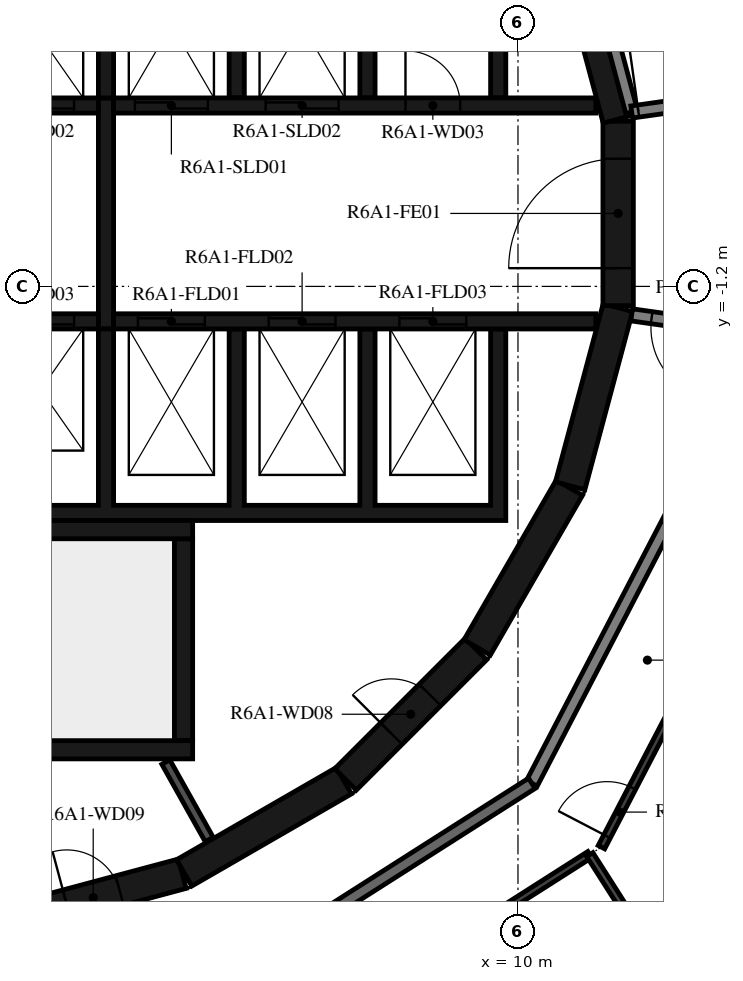
"""IFC4 building model, lengths in metres.
Left out: names, types, materials, properties, quantities, classifications, styles, units other than length and angle.
Written with IfcOpenShell. Run it as: python <this file> out.ifc"""

import sys

from ifc_helpers import new_model, si_unit, direction, frame, frame_2d, origin, place, context, subcontext, project, spatial, polyline, rectangle, outline, extrude, element, fill, save


model = new_model("IFC4")
c1 = context("Model", 3, precision=1e-05, world=origin(), true_north=direction((0.0, 1.0)))
c2 = subcontext(c1, "Body", "Model", "MODEL_VIEW")
j1 = project(units=[si_unit("LENGTHUNIT", "METRE"), si_unit("PLANEANGLEUNIT", "RADIAN")], contexts=[c1])
p1 = place(None, origin())
s1 = spatial("IfcSite", under=j1, at=p1, CompositionType="ELEMENT")
p2 = place(p1, origin())
s2 = spatial("IfcBuilding", under=s1, at=p2, CompositionType="ELEMENT")
p3 = place(p2, frame((0.0, 0.0, 230.2)))
s3 = spatial("IfcBuildingStorey", under=s2, at=p3, CompositionType="ELEMENT", Elevation=230.2)
p4 = place(p3, frame((1.55, -11.643, 0.0), z_axis=(0.0, 0.0, 1.0), x_axis=(0.965948410781, 0.258734743916, 0.0)))
e1 = element("IfcWall", 1, at=p4, inside=s3, PredefinedType="SHEAR", context=c2, shape_type="SweptSolid", body=[
    extrude(rectangle(XDim=3.033, YDim=0.5, at=frame_2d((1.516, 0.0))), origin(), (0.0, 0.0, 1.0), 3.12),
])
p5 = place(p4, frame((1.066, 0.0, 0.0)))
e2 = element("IfcOpeningElement", 2, at=p5, cuts=e1, PredefinedType="OPENING", context=c2, shape_type="SweptSolid", body=[
    extrude(rectangle(XDim=0.9, YDim=2.1, at=frame_2d((0.45, 1.05))), frame((0.0, 0.26, 0.0), z_axis=(0.0, -1.0, 0.0), x_axis=(1.0, 0.0, 0.0)), (0.0, 0.0, 1.0), 0.52),
])
p6 = place(p3, frame((4.51, -10.845, 0.0), z_axis=(0.0, 0.0, 1.0), x_axis=(0.865975092491, 0.500087131594, 0.0)))
e3 = element("IfcWall", 3, at=p6, inside=s3, PredefinedType="SHEAR", context=c2, shape_type="SweptSolid", body=[
    extrude(rectangle(XDim=3.033, YDim=0.5, at=frame_2d((1.516, 0.0))), origin(), (0.0, 0.0, 1.0), 3.12),
])
p7 = place(p3, frame((7.164, -9.308, 0.0), z_axis=(0.0, 0.0, 1.0), x_axis=(0.707106781187, 0.707106781187, 0.0)))
e4 = element("IfcWall", 4, at=p7, inside=s3, PredefinedType="SHEAR", context=c2, shape_type="SweptSolid", body=[
    extrude(rectangle(XDim=3.032, YDim=0.5, at=frame_2d((1.516, 0.0))), origin(), (0.0, 0.0, 1.0), 3.12),
])
p8 = place(p7, frame((1.066, 0.0, 0.0)))
e5 = element("IfcOpeningElement", 5, at=p8, cuts=e4, PredefinedType="OPENING", context=c2, shape_type="SweptSolid", body=[
    extrude(rectangle(XDim=0.9, YDim=2.1, at=frame_2d((0.45, 1.05))), frame((0.0, 0.26, 0.0), z_axis=(0.0, -1.0, 0.0), x_axis=(1.0, 0.0, 0.0)), (0.0, 0.0, 1.0), 0.52),
])
for number, where, z_axis, x_axis in (
    (6, (9.329, -7.137, 0.0), (0.0, 0.0, 1.0), (0.5, 0.866, 0.0)),
    (7, (10.858, -4.479, 0.0), (0.0, 0.0, 1.0), (0.259, 0.966, 0.0)),
):
    element("IfcWall", number, at=place(p3, frame(where, z_axis=z_axis, x_axis=x_axis)), inside=s3, PredefinedType="SHEAR", context=c2, shape_type="SweptSolid", body=[
        extrude(rectangle(XDim=3.033, YDim=0.5, at=frame_2d((1.516, 0.0))), origin(), (0.0, 0.0, 1.0), 3.12),
    ])
p9 = place(p3, frame((11.647, -1.516, 0.0), z_axis=(0.0, 0.0, 1.0), x_axis=(0.0, 1.0, 0.0)))
e8 = element("IfcWall", 8, at=p9, inside=s3, PredefinedType="SHEAR", context=c2, shape_type="SweptSolid", body=[
    extrude(rectangle(XDim=3.033, YDim=0.5, at=frame_2d((1.516, 0.0))), origin(), (0.0, 0.0, 1.0), 3.12),
])
p10 = place(p9, frame((0.616, 0.0, 0.0)))
e9 = element("IfcOpeningElement", 9, at=p10, cuts=e8, PredefinedType="OPENING", context=c2, shape_type="SweptSolid", body=[
    extrude(rectangle(XDim=1.8, YDim=2.1, at=frame_2d((0.9, 1.05))), frame((0.0, 0.26, 0.0), z_axis=(0.0, -1.0, 0.0), x_axis=(1.0, 0.0, 0.0)), (0.0, 0.0, 1.0), 0.52),
])
p11 = place(p3, frame((11.643, 1.55, 0.0), z_axis=(0.0, 0.0, 1.0), x_axis=(-0.258734743916, 0.965948410781, 0.0)))
e10 = element("IfcWall", 10, at=p11, inside=s3, PredefinedType="SHEAR", context=c2, shape_type="SweptSolid", body=[
    extrude(rectangle(XDim=3.033, YDim=0.5, at=frame_2d((1.516, 0.0))), origin(), (0.0, 0.0, 1.0), 3.12),
])
p12 = place(p3, frame((-2.4, -5.2, 0.0), z_axis=(0.0, 0.0, 1.0), x_axis=(1.0, 0.0, 0.0)))
e11 = element("IfcWall", 11, at=p12, inside=s3, PredefinedType="SHEAR", context=c2, shape_type="SweptSolid", body=[
    extrude(rectangle(XDim=7.05, YDim=0.3, at=frame_2d((3.525, 0.0))), origin(), (0.0, 0.0, 1.0), 3.12),
])
p13 = place(p3, frame((4.5, -8.67, 0.0), z_axis=(0.0, 0.0, 1.0), x_axis=(0.0, 1.0, 0.0)))
e12 = element("IfcWall", 12, at=p13, inside=s3, PredefinedType="SHEAR", context=c2, shape_type="SweptSolid", body=[
    extrude(rectangle(XDim=3.32, YDim=0.3, at=frame_2d((1.66, 0.0))), origin(), (0.0, 0.0, 1.0), 3.12),
])
p14 = place(p3, frame((0.1, -8.82, 0.0), z_axis=(0.0, 0.0, 1.0), x_axis=(1.0, 0.0, 0.0)))
e13 = element("IfcWall", 13, at=p14, inside=s3, PredefinedType="SHEAR", context=c2, shape_type="SweptSolid", body=[
    extrude(rectangle(XDim=4.55, YDim=0.3, at=frame_2d((2.275, 0.0))), origin(), (0.0, 0.0, 1.0), 3.12),
])
p15 = place(p3, origin())
e14 = element("IfcWall", 14, at=p15, inside=s3, PredefinedType="SHEAR", context=c2, shape_type="SweptSolid", body=[
    extrude(outline(polyline([(-9.55, 4.8), (-5.5, 4.8), (-5.5, 1.9), (-5.25, 1.9), (-5.25, 4.8), (-1.2, 4.8), (-1.2, 1.9), (-0.95, 1.9), (-0.95, 4.8), (0.95, 4.8), (0.95, 1.9), (1.2, 1.9), (1.2, 4.8), (3.1, 4.8), (3.1, 1.9), (3.35, 1.9), (3.35, 4.8), (5.25, 4.8), (5.25, 1.9), (5.5, 1.9), (5.5, 4.8), (7.4, 4.8), (7.4, 1.9), (7.65, 1.9), (7.65, 4.8), (9.55, 4.8), (9.55, 1.9), (9.8, 1.9), (9.8, 4.8), (9.8, 5.05), (-9.8, 5.05), (-9.8, 4.8), (-9.8, 1.9), (-9.55, 1.9), (-9.55, 4.8)])), origin(), (0.0, 0.0, 1.0), 3.12),
])
p16 = place(p3, origin())
e15 = element("IfcWall", 15, at=p16, inside=s3, PredefinedType="SHEAR", context=c2, shape_type="SweptSolid", body=[
    extrude(outline(polyline([(9.8, -5.05), (9.8, -4.8), (9.8, -1.9), (9.55, -1.9), (9.55, -4.8), (7.65, -4.8), (7.65, -1.9), (7.4, -1.9), (7.4, -4.8), (5.5, -4.8), (5.5, -1.9), (5.25, -1.9), (5.25, -4.8), (3.35, -4.8), (3.35, -1.9), (3.1, -1.9), (3.1, -4.8), (1.2, -4.8), (1.2, -1.9), (0.95, -1.9), (0.95, -4.8), (-0.95, -4.8), (-0.95, -1.9), (-1.2, -1.9), (-1.2, -4.8), (-5.25, -4.8), (-5.25, -1.9), (-5.5, -1.9), (-5.5, -4.8), (-7.4, -4.8), (-7.4, -1.9), (-7.65, -1.9), (-7.65, -4.8), (-9.55, -4.8), (-9.55, -1.9), (-9.8, -1.9), (-9.8, -4.8), (-9.8, -5.05), (9.8, -5.05)])), origin(), (0.0, 0.0, 1.0), 3.12),
])
p17 = place(p3, frame((-11.28, 1.775, 0.0), z_axis=(0.0, 0.0, 1.0), x_axis=(1.0, 0.0, 0.0)))
e16 = element("IfcWall", 16, at=p17, inside=s3, PredefinedType="SHEAR", context=c2, shape_type="SweptSolid", body=[
    extrude(rectangle(XDim=14.38, YDim=0.25, at=frame_2d((7.19, 0.0))), origin(), (0.0, 0.0, 1.0), 3.12),
])
p18 = place(p17, frame((10.73, 0.0, 0.0)))
e17 = element("IfcOpeningElement", 17, at=p18, cuts=e16, PredefinedType="OPENING", context=c2, shape_type="SweptSolid", body=[
    extrude(rectangle(XDim=1.1, YDim=2.1, at=frame_2d((0.55, 1.05))), frame((0.0, 0.135, 0.0), z_axis=(0.0, -1.0, 0.0), x_axis=(1.0, 0.0, 0.0)), (0.0, 0.0, 1.0), 0.27),
])
p19 = place(p17, frame((12.88, 0.0, 0.0)))
e18 = element("IfcOpeningElement", 18, at=p19, cuts=e16, PredefinedType="OPENING", context=c2, shape_type="SweptSolid", body=[
    extrude(rectangle(XDim=1.1, YDim=2.1, at=frame_2d((0.55, 1.05))), frame((0.0, 0.135, 0.0), z_axis=(0.0, -1.0, 0.0), x_axis=(1.0, 0.0, 0.0)), (0.0, 0.0, 1.0), 0.27),
])
p20 = place(p17, frame((3.305, 0.0, 0.0)))
e19 = element("IfcOpeningElement", 19, at=p20, cuts=e16, PredefinedType="OPENING", context=c2, shape_type="SweptSolid", body=[
    extrude(rectangle(XDim=0.9, YDim=2.1, at=frame_2d((0.45, 1.05))), frame((0.0, 0.135, 0.0), z_axis=(0.0, -1.0, 0.0), x_axis=(1.0, 0.0, 0.0)), (0.0, 0.0, 1.0), 0.27),
])
p21 = place(p17, frame((7.605, 0.0, 0.0)))
e20 = element("IfcOpeningElement", 20, at=p21, cuts=e16, PredefinedType="OPENING", context=c2, shape_type="SweptSolid", body=[
    extrude(rectangle(XDim=0.9, YDim=2.1, at=frame_2d((0.45, 1.05))), frame((0.0, 0.135, 0.0), z_axis=(0.0, -1.0, 0.0), x_axis=(1.0, 0.0, 0.0)), (0.0, 0.0, 1.0), 0.27),
])
p22 = place(p3, frame((3.35, 1.775, 0.0), z_axis=(0.0, 0.0, 1.0), x_axis=(1.0, 0.0, 0.0)))
e21 = element("IfcWall", 21, at=p22, inside=s3, PredefinedType="SHEAR", context=c2, shape_type="SweptSolid", body=[
    extrude(rectangle(XDim=7.93, YDim=0.25, at=frame_2d((3.965, 0.0))), origin(), (0.0, 0.0, 1.0), 3.12),
])
p23 = place(p22, frame((0.35, 0.0, 0.0)))
e22 = element("IfcOpeningElement", 22, at=p23, cuts=e21, PredefinedType="OPENING", context=c2, shape_type="SweptSolid", body=[
    extrude(rectangle(XDim=1.2, YDim=2.4, at=frame_2d((0.6, 1.2))), frame((0.0, 0.135, 0.0), z_axis=(0.0, -1.0, 0.0), x_axis=(1.0, 0.0, 0.0)), (0.0, 0.0, 1.0), 0.27),
])
p24 = place(p22, frame((2.5, 0.0, 0.0)))
e23 = element("IfcOpeningElement", 23, at=p24, cuts=e21, PredefinedType="OPENING", context=c2, shape_type="SweptSolid", body=[
    extrude(rectangle(XDim=1.2, YDim=2.4, at=frame_2d((0.6, 1.2))), frame((0.0, 0.135, 0.0), z_axis=(0.0, -1.0, 0.0), x_axis=(1.0, 0.0, 0.0)), (0.0, 0.0, 1.0), 0.27),
])
p25 = place(p22, frame((4.8, 0.0, 0.0)))
e24 = element("IfcOpeningElement", 24, at=p25, cuts=e21, PredefinedType="OPENING", context=c2, shape_type="SweptSolid", body=[
    extrude(rectangle(XDim=0.9, YDim=2.1, at=frame_2d((0.45, 1.05))), frame((0.0, 0.135, 0.0), z_axis=(0.0, -1.0, 0.0), x_axis=(1.0, 0.0, 0.0)), (0.0, 0.0, 1.0), 0.27),
])
p26 = place(p3, frame((-11.28, -1.775, 0.0), z_axis=(0.0, 0.0, 1.0), x_axis=(1.0, 0.0, 0.0)))
e25 = element("IfcWall", 25, at=p26, inside=s3, PredefinedType="SHEAR", context=c2, shape_type="SweptSolid", body=[
    extrude(rectangle(XDim=14.38, YDim=0.25, at=frame_2d((7.19, 0.0))), origin(), (0.0, 0.0, 1.0), 3.12),
])
p27 = place(p26, frame((12.88, 0.0, 0.0)))
e26 = element("IfcOpeningElement", 26, at=p27, cuts=e25, PredefinedType="OPENING", context=c2, shape_type="SweptSolid", body=[
    extrude(rectangle(XDim=1.1, YDim=2.1, at=frame_2d((0.55, 1.05))), frame((0.0, 0.135, 0.0), z_axis=(0.0, -1.0, 0.0), x_axis=(1.0, 0.0, 0.0)), (0.0, 0.0, 1.0), 0.27),
])
p28 = place(p26, frame((7.605, 0.0, 0.0)))
e27 = element("IfcOpeningElement", 27, at=p28, cuts=e25, PredefinedType="OPENING", context=c2, shape_type="SweptSolid", body=[
    extrude(rectangle(XDim=0.9, YDim=2.1, at=frame_2d((0.45, 1.05))), frame((0.0, 0.135, 0.0), z_axis=(0.0, -1.0, 0.0), x_axis=(1.0, 0.0, 0.0)), (0.0, 0.0, 1.0), 0.27),
])
p29 = place(p26, frame((10.83, 0.0, 0.0)))
e28 = element("IfcOpeningElement", 28, at=p29, cuts=e25, PredefinedType="OPENING", context=c2, shape_type="SweptSolid", body=[
    extrude(rectangle(XDim=0.9, YDim=2.1, at=frame_2d((0.45, 1.05))), frame((0.0, 0.135, 0.0), z_axis=(0.0, -1.0, 0.0), x_axis=(1.0, 0.0, 0.0)), (0.0, 0.0, 1.0), 0.27),
])
p30 = place(p3, frame((3.35, -1.775, 0.0), z_axis=(0.0, 0.0, 1.0), x_axis=(1.0, 0.0, 0.0)))
e29 = element("IfcWall", 29, at=p30, inside=s3, PredefinedType="SHEAR", context=c2, shape_type="SweptSolid", body=[
    extrude(rectangle(XDim=7.93, YDim=0.25, at=frame_2d((3.965, 0.0))), origin(), (0.0, 0.0, 1.0), 3.12),
])
p31 = place(p30, frame((0.4, 0.0, 0.0)))
e30 = element("IfcOpeningElement", 30, at=p31, cuts=e29, PredefinedType="OPENING", context=c2, shape_type="SweptSolid", body=[
    extrude(rectangle(XDim=1.1, YDim=2.4, at=frame_2d((0.55, 1.2))), frame((0.0, 0.135, 0.0), z_axis=(0.0, -1.0, 0.0), x_axis=(1.0, 0.0, 0.0)), (0.0, 0.0, 1.0), 0.27),
])
p32 = place(p30, frame((2.55, 0.0, 0.0)))
e31 = element("IfcOpeningElement", 31, at=p32, cuts=e29, PredefinedType="OPENING", context=c2, shape_type="SweptSolid", body=[
    extrude(rectangle(XDim=1.1, YDim=2.4, at=frame_2d((0.55, 1.2))), frame((0.0, 0.135, 0.0), z_axis=(0.0, -1.0, 0.0), x_axis=(1.0, 0.0, 0.0)), (0.0, 0.0, 1.0), 0.27),
])
p33 = place(p30, frame((4.7, 0.0, 0.0)))
e32 = element("IfcOpeningElement", 32, at=p33, cuts=e29, PredefinedType="OPENING", context=c2, shape_type="SweptSolid", body=[
    extrude(rectangle(XDim=1.1, YDim=2.4, at=frame_2d((0.55, 1.2))), frame((0.0, 0.135, 0.0), z_axis=(0.0, -1.0, 0.0), x_axis=(1.0, 0.0, 0.0)), (0.0, 0.0, 1.0), 0.27),
])
p34 = place(p3, frame((3.225, -1.9, 0.0), z_axis=(0.0, 0.0, 1.0), x_axis=(0.0, 1.0, 0.0)))
e33 = element("IfcWall", 33, at=p34, inside=s3, PredefinedType="SHEAR", context=c2, shape_type="SweptSolid", body=[
    extrude(rectangle(XDim=3.8, YDim=0.25, at=frame_2d((1.9, 0.0))), origin(), (0.0, 0.0, 1.0), 3.12),
])
p35 = place(p3, frame((4.922, -10.296, 0.0), z_axis=(0.0, 0.0, 1.0), x_axis=(-0.48860846254, 0.872503163509, 0.0)))
e34 = element("IfcWall", 34, at=p35, inside=s3, PredefinedType="PARTITIONING", context=c2, shape_type="SweptSolid", body=[
    extrude(rectangle(XDim=1.459, YDim=0.15, at=frame_2d((0.73, 0.0))), origin(), (0.0, 0.0, 1.0), 3.12),
])
p36 = place(p3, frame((11.87, 1.668, 0.0), z_axis=(0.0, 0.0, 1.0), x_axis=(-0.258836880648, 0.965921047093, 0.0)))
e35 = element("IfcWall", 35, at=p36, inside=s3, PredefinedType="STANDARD", context=c2, shape_type="SweptSolid", body=[
    extrude(rectangle(XDim=1.695, YDim=0.2, at=frame_2d((0.848, 0.0))), origin(), (0.0, 0.0, 1.0), 3.12),
])
p37 = place(p3, frame((11.87, 1.668, 0.0), z_axis=(0.0, 0.0, 1.0), x_axis=(0.990267985606, 0.139173692496, 0.0)))
e36 = element("IfcWall", 36, at=p37, inside=s3, PredefinedType="STANDARD", context=c2, shape_type="SweptSolid", body=[
    extrude(rectangle(XDim=1.475, YDim=0.2, at=frame_2d((0.738, 0.0))), origin(), (0.0, 0.0, 1.0), 3.12),
])
p38 = place(p37, frame((0.11, 0.0, 0.0)))
e37 = element("IfcOpeningElement", 37, at=p38, cuts=e36, PredefinedType="OPENING", context=c2, shape_type="SweptSolid", body=[
    extrude(rectangle(XDim=1.2, YDim=2.1, at=frame_2d((0.6, 1.05))), frame((0.0, 0.11, 0.0), z_axis=(0.0, -1.0, 0.0), x_axis=(1.0, 0.0, 0.0)), (0.0, 0.0, 1.0), 0.22),
])
p39 = place(p3, frame((10.228, -9.372, 0.0), z_axis=(0.0, 0.0, 1.0), x_axis=(0.461759464021, 0.887005184532, 0.0)))
e38 = element("IfcWall", 38, at=p39, inside=s3, PredefinedType="STANDARD", context=c2, shape_type="SweptSolid", body=[
    extrude(rectangle(XDim=7.181, YDim=0.2, at=frame_2d((3.591, 0.0))), origin(), (0.0, 0.0, 1.0), 3.12),
])
p40 = place(p3, frame((13.496, -1.897, 0.0), z_axis=(0.0, 0.0, 1.0), x_axis=(-0.99026234641, 0.139213811391, 0.0)))
e39 = element("IfcWall", 39, at=p40, inside=s3, PredefinedType="STANDARD", context=c2, shape_type="SweptSolid", body=[
    extrude(rectangle(XDim=1.641, YDim=0.2, at=frame_2d((0.821, 0.0))), origin(), (0.0, 0.0, 1.0), 3.12),
])
p41 = place(p40, frame((0.11, 0.0, 0.0)))
e40 = element("IfcOpeningElement", 40, at=p41, cuts=e39, PredefinedType="OPENING", context=c2, shape_type="SweptSolid", body=[
    extrude(rectangle(XDim=1.2, YDim=2.1, at=frame_2d((0.6, 1.05))), frame((0.0, 0.11, 0.0), z_axis=(0.0, -1.0, 0.0), x_axis=(1.0, 0.0, 0.0)), (0.0, 0.0, 1.0), 0.22),
])
p42 = place(p3, frame((4.172, -13.231, 0.0), z_axis=(0.0, 0.0, 1.0), x_axis=(0.843388394728, 0.537304397561, 0.0)))
e41 = element("IfcWall", 41, at=p42, inside=s3, PredefinedType="STANDARD", context=c2, shape_type="SweptSolid", body=[
    extrude(rectangle(XDim=7.181, YDim=0.2, at=frame_2d((3.59, 0.0))), origin(), (0.0, 0.0, 1.0), 3.12),
])
p43 = place(p42, frame((0.2, 0.0, 0.0)))
e42 = element("IfcOpeningElement", 42, at=p43, cuts=e41, PredefinedType="OPENING", context=c2, shape_type="SweptSolid", body=[
    extrude(rectangle(XDim=1.0, YDim=2.1, at=frame_2d((0.5, 1.05))), frame((0.0, 0.11, 0.0), z_axis=(0.0, -1.0, 0.0), x_axis=(1.0, 0.0, 0.0)), (0.0, 0.0, 1.0), 0.22),
])
p44 = place(p3, frame((4.83, -14.59, 0.0), z_axis=(0.0, 0.0, 1.0), x_axis=(0.843393042763, 0.537297101629, 0.0)))
e43 = element("IfcWall", 43, at=p44, inside=s3, PredefinedType="PARTITIONING", context=c2, shape_type="SweptSolid", body=[
    extrude(rectangle(XDim=7.53, YDim=0.12, at=frame_2d((3.765, 0.0))), origin(), (0.0, 0.0, 1.0), 3.12),
])
p45 = place(p44, frame((0.2, 0.0, 0.0)))
e44 = element("IfcOpeningElement", 44, at=p45, cuts=e43, PredefinedType="OPENING", context=c2, shape_type="SweptSolid", body=[
    extrude(rectangle(XDim=0.9, YDim=2.1, at=frame_2d((0.45, 1.05))), frame((0.0, 0.07, 0.0), z_axis=(0.0, -1.0, 0.0), x_axis=(1.0, 0.0, 0.0)), (0.0, 0.0, 1.0), 0.14),
])
p46 = place(p3, frame((11.373, -10.421, 0.0), z_axis=(0.0, 0.0, 1.0), x_axis=(0.461738939635, 0.887015868869, 0.0)))
e45 = element("IfcWall", 45, at=p46, inside=s3, PredefinedType="PARTITIONING", context=c2, shape_type="SweptSolid", body=[
    extrude(rectangle(XDim=5.752, YDim=0.12, at=frame_2d((2.876, 0.0))), origin(), (0.0, 0.0, 1.0), 3.12),
])
p47 = place(p46, frame((0.2, 0.0, 0.0)))
e46 = element("IfcOpeningElement", 46, at=p47, cuts=e45, PredefinedType="OPENING", context=c2, shape_type="SweptSolid", body=[
    extrude(rectangle(XDim=0.9, YDim=2.1, at=frame_2d((0.45, 1.05))), frame((0.0, 0.07, 0.0), z_axis=(0.0, -1.0, 0.0), x_axis=(1.0, 0.0, 0.0)), (0.0, 0.0, 1.0), 0.14),
])
p48 = place(p3, frame((12.758, -13.018, 0.0), z_axis=(0.0, 0.0, 1.0), x_axis=(-0.537338423153, 0.843366716798, 0.0)))
e47 = element("IfcWall", 47, at=p48, inside=s3, PredefinedType="PARTITIONING", context=c2, shape_type="SweptSolid", body=[
    extrude(rectangle(XDim=2.934, YDim=0.12, at=frame_2d((1.467, 0.0))), origin(), (0.0, 0.0, 1.0), 2.73),
])
p49 = place(p10, origin())
e48 = element("IfcDoor", 48, at=p49, inside=s3, OperationType="DOUBLE_DOOR_SINGLE_SWING", PredefinedType="DOOR", context=c2, shape_type="SweptSolid", body=[
    extrude(rectangle(XDim=1.8, YDim=2.1, at=frame_2d((0.9, 1.05))), frame((0.0, 0.025, 0.0), z_axis=(0.0, -1.0, 0.0), x_axis=(1.0, 0.0, 0.0)), (0.0, 0.0, 1.0), 0.05),
])
fill(e9, e48)
p50 = place(p19, origin())
e49 = element("IfcDoor", 49, at=p50, inside=s3, OperationType="DOUBLE_DOOR_SLIDING", PredefinedType="DOOR", context=c2, shape_type="SweptSolid", body=[
    extrude(rectangle(XDim=1.1, YDim=2.1, at=frame_2d((0.55, 1.05))), frame((0.0, 0.025, 0.0), z_axis=(0.0, -1.0, 0.0), x_axis=(1.0, 0.0, 0.0)), (0.0, 0.0, 1.0), 0.05),
])
fill(e18, e49)
p51 = place(p23, origin())
e50 = element("IfcDoor", 50, at=p51, inside=s3, OperationType="DOUBLE_DOOR_SLIDING", PredefinedType="DOOR", context=c2, shape_type="SweptSolid", body=[
    extrude(rectangle(XDim=1.2, YDim=2.4, at=frame_2d((0.6, 1.2))), frame((0.0, 0.025, 0.0), z_axis=(0.0, -1.0, 0.0), x_axis=(1.0, 0.0, 0.0)), (0.0, 0.0, 1.0), 0.05),
])
fill(e22, e50)
p52 = place(p24, origin())
e51 = element("IfcDoor", 51, at=p52, inside=s3, OperationType="DOUBLE_DOOR_SLIDING", PredefinedType="DOOR", context=c2, shape_type="SweptSolid", body=[
    extrude(rectangle(XDim=1.2, YDim=2.4, at=frame_2d((0.6, 1.2))), frame((0.0, 0.025, 0.0), z_axis=(0.0, -1.0, 0.0), x_axis=(1.0, 0.0, 0.0)), (0.0, 0.0, 1.0), 0.05),
])
fill(e23, e51)
p53 = place(p27, origin())
e52 = element("IfcDoor", 52, at=p53, inside=s3, OperationType="DOUBLE_DOOR_SLIDING", PredefinedType="DOOR", context=c2, shape_type="SweptSolid", body=[
    extrude(rectangle(XDim=1.1, YDim=2.1, at=frame_2d((0.55, 1.05))), frame((0.0, 0.025, 0.0), z_axis=(0.0, -1.0, 0.0), x_axis=(1.0, 0.0, 0.0)), (0.0, 0.0, 1.0), 0.05),
])
fill(e26, e52)
p54 = place(p31, origin())
e53 = element("IfcDoor", 53, at=p54, inside=s3, OperationType="DOUBLE_DOOR_SLIDING", PredefinedType="DOOR", context=c2, shape_type="SweptSolid", body=[
    extrude(rectangle(XDim=1.1, YDim=2.4, at=frame_2d((0.55, 1.2))), frame((0.0, 0.025, 0.0), z_axis=(0.0, -1.0, 0.0), x_axis=(1.0, 0.0, 0.0)), (0.0, 0.0, 1.0), 0.05),
])
fill(e30, e53)
p55 = place(p32, origin())
e54 = element("IfcDoor", 54, at=p55, inside=s3, OperationType="DOUBLE_DOOR_SLIDING", PredefinedType="DOOR", context=c2, shape_type="SweptSolid", body=[
    extrude(rectangle(XDim=1.1, YDim=2.4, at=frame_2d((0.55, 1.2))), frame((0.0, 0.025, 0.0), z_axis=(0.0, -1.0, 0.0), x_axis=(1.0, 0.0, 0.0)), (0.0, 0.0, 1.0), 0.05),
])
fill(e31, e54)
p56 = place(p33, origin())
e55 = element("IfcDoor", 55, at=p56, inside=s3, OperationType="DOUBLE_DOOR_SLIDING", PredefinedType="DOOR", context=c2, shape_type="SweptSolid", body=[
    extrude(rectangle(XDim=1.1, YDim=2.4, at=frame_2d((0.55, 1.2))), frame((0.0, 0.025, 0.0), z_axis=(0.0, -1.0, 0.0), x_axis=(1.0, 0.0, 0.0)), (0.0, 0.0, 1.0), 0.05),
])
fill(e32, e55)
p57 = place(p25, origin())
e56 = element("IfcDoor", 56, at=p57, inside=s3, OperationType="SINGLE_SWING_LEFT", PredefinedType="DOOR", context=c2, shape_type="SweptSolid", body=[
    extrude(rectangle(XDim=0.9, YDim=2.1, at=frame_2d((0.45, 1.05))), frame((0.0, 0.025, 0.0), z_axis=(0.0, -1.0, 0.0), x_axis=(1.0, 0.0, 0.0)), (0.0, 0.0, 1.0), 0.05),
])
fill(e24, e56)
p58 = place(p8, origin())
e57 = element("IfcDoor", 57, at=p58, inside=s3, OperationType="SINGLE_SWING_RIGHT", PredefinedType="DOOR", context=c2, shape_type="SweptSolid", body=[
    extrude(rectangle(XDim=0.9, YDim=2.1, at=frame_2d((0.45, 1.05))), frame((0.0, 0.025, 0.0), z_axis=(0.0, -1.0, 0.0), x_axis=(1.0, 0.0, 0.0)), (0.0, 0.0, 1.0), 0.05),
])
fill(e5, e57)
p59 = place(p5, origin())
e58 = element("IfcDoor", 58, at=p59, inside=s3, OperationType="SINGLE_SWING_LEFT", PredefinedType="DOOR", context=c2, shape_type="SweptSolid", body=[
    extrude(rectangle(XDim=0.9, YDim=2.1, at=frame_2d((0.45, 1.05))), frame((0.0, 0.025, 0.0), z_axis=(0.0, -1.0, 0.0), x_axis=(1.0, 0.0, 0.0)), (0.0, 0.0, 1.0), 0.05),
])
fill(e2, e58)
p60 = place(p47, origin())
e59 = element("IfcDoor", 59, at=p60, inside=s3, OperationType="SINGLE_SWING_RIGHT", PredefinedType="DOOR", context=c2, shape_type="SweptSolid", body=[
    extrude(rectangle(XDim=0.9, YDim=2.1, at=frame_2d((0.45, 1.05))), frame((0.0, 0.025, 0.0), z_axis=(0.0, -1.0, 0.0), x_axis=(1.0, 0.0, 0.0)), (0.0, 0.0, 1.0), 0.05),
])
fill(e46, e59)
p61 = place(p38, origin())
e60 = element("IfcDoor", 60, at=p61, inside=s3, OperationType="DOUBLE_DOOR_SINGLE_SWING", PredefinedType="DOOR", context=c2, shape_type="SweptSolid", body=[
    extrude(rectangle(XDim=1.2, YDim=2.1, at=frame_2d((0.6, 1.05))), frame((0.0, 0.025, 0.0), z_axis=(0.0, -1.0, 0.0), x_axis=(1.0, 0.0, 0.0)), (0.0, 0.0, 1.0), 0.05),
])
fill(e37, e60)
p62 = place(p41, origin())
e61 = element("IfcDoor", 61, at=p62, inside=s3, OperationType="DOUBLE_DOOR_SINGLE_SWING", PredefinedType="DOOR", context=c2, shape_type="SweptSolid", body=[
    extrude(rectangle(XDim=1.2, YDim=2.1, at=frame_2d((0.6, 1.05))), frame((0.0, 0.025, 0.0), z_axis=(0.0, -1.0, 0.0), x_axis=(1.0, 0.0, 0.0)), (0.0, 0.0, 1.0), 0.05),
])
fill(e40, e61)
save(model, sys.argv[1])
